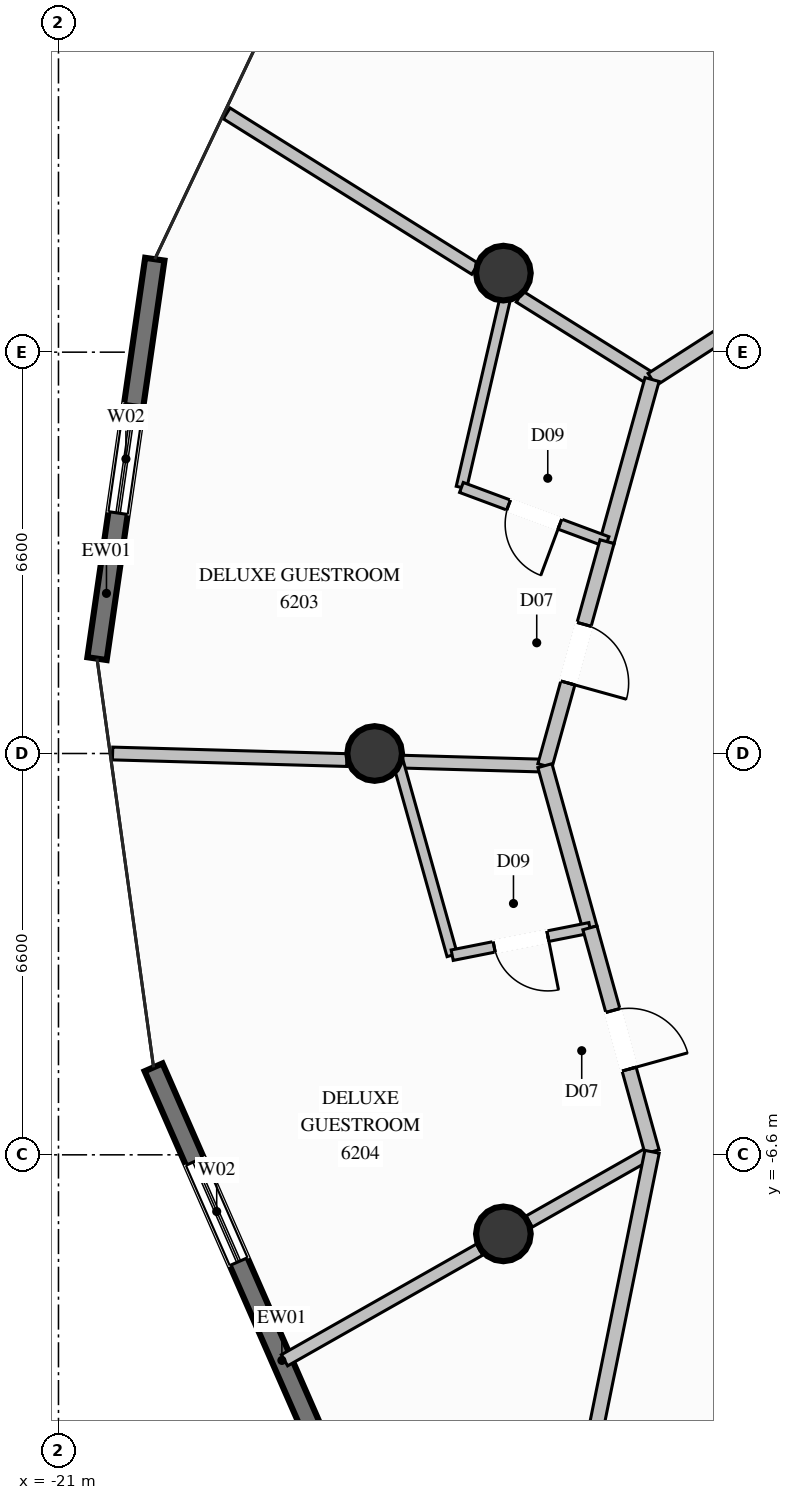
"""IFC4 building model, lengths in metres.
Left out: names, types, materials, properties, quantities, classifications, styles, units other than length and angle.
Written with IfcOpenShell. Run it as: python <this file> out.ifc"""

import sys

from ifc_helpers import new_model, si_unit, direction, frame, frame_2d, origin, origin_2d, place, context, subcontext, project, spatial, rectangle, circle, extrude, element, fill, save


model = new_model("IFC4")
c1 = context("Model", 3, precision=1e-05, world=origin(), true_north=direction((0.0, 1.0)))
c2 = subcontext(c1, "Body", "Model", "MODEL_VIEW")
j1 = project(units=[si_unit("LENGTHUNIT", "METRE"), si_unit("PLANEANGLEUNIT", "RADIAN")], contexts=[c1])
p1 = place(None, origin())
s1 = spatial("IfcSite", under=j1, at=p1, CompositionType="ELEMENT")
p2 = place(p1, origin())
s2 = spatial("IfcBuilding", under=s1, at=p2, CompositionType="ELEMENT")
p3 = place(p2, frame((0.0, 0.0, 230.8)))
s3 = spatial("IfcBuildingStorey", under=s2, at=p3, CompositionType="ELEMENT", Elevation=230.8)
for number, where, z_axis, x_axis in (
    (1, (-13.683, 7.9, 0.0), (0.0, 0.0, 1.0), (1.0, 0.0, 0.0)),
    (2, (-15.8, 0.0, 0.0), (0.0, 0.0, 1.0), (1.0, 0.0, 0.0)),
    (3, (-13.683, -7.9, 0.0), (0.0, 0.0, 1.0), (1.0, 0.0, 0.0)),
):
    element("IfcColumn", number, at=place(p3, frame(where, z_axis=z_axis, x_axis=x_axis)), inside=s3, PredefinedType="COLUMN", context=c2, shape_type="SweptSolid", body=[
        extrude(circle(Radius=0.45, at=origin_2d()), origin(), (0.0, 0.0, 1.0), 3.6),
    ])
p4 = place(p3, frame((-20.366, 1.56, 0.0), z_axis=(0.0, 0.0, 1.0), x_axis=(0.143125707186, 0.989704517491, 0.0)))
e4 = element("IfcWall", 4, at=p4, inside=s3, PredefinedType="SOLIDWALL", context=c2, shape_type="SweptSolid", body=[
    extrude(rectangle(XDim=6.637, YDim=0.32, at=frame_2d((3.319, 0.0))), origin(), (0.0, 0.0, 1.0), 3.2),
])
p5 = place(p4, frame((2.419, 0.0, 0.35)))
e5 = element("IfcOpeningElement", 5, at=p5, cuts=e4, PredefinedType="OPENING", context=c2, shape_type="SweptSolid", body=[
    extrude(rectangle(XDim=1.8, YDim=2.6, at=frame_2d((0.9, 1.3))), frame((0.0, 0.17, 0.0), z_axis=(0.0, -1.0, 0.0), x_axis=(1.0, 0.0, 0.0)), (0.0, 0.0, 1.0), 0.34),
])
p6 = place(p3, frame((-16.715, -11.376, 0.0), z_axis=(0.0, 0.0, 1.0), x_axis=(-0.401047234641, 0.916057375707, 0.0)))
e6 = element("IfcWall", 6, at=p6, inside=s3, PredefinedType="SOLIDWALL", context=c2, shape_type="SweptSolid", body=[
    extrude(rectangle(XDim=6.785, YDim=0.32, at=frame_2d((3.392, 0.0))), origin(), (0.0, 0.0, 1.0), 3.2),
])
p7 = place(p6, frame((3.296, 0.0, 0.35)))
e7 = element("IfcOpeningElement", 7, at=p7, cuts=e6, PredefinedType="OPENING", context=c2, shape_type="SweptSolid", body=[
    extrude(rectangle(XDim=1.8, YDim=2.6, at=frame_2d((0.9, 1.3))), frame((0.0, 0.17, 0.0), z_axis=(0.0, -1.0, 0.0), x_axis=(1.0, 0.0, 0.0)), (0.0, 0.0, 1.0), 0.34),
])
p8 = place(p3, frame((-11.238, 6.15, 0.0), z_axis=(0.0, 0.0, 1.0), x_axis=(-0.847683196706, 0.530502778524, 0.0)))
e8 = element("IfcWall", 8, at=p8, inside=s3, PredefinedType="PARTITIONING", context=c2, shape_type="SweptSolid", body=[
    extrude(rectangle(XDim=2.569, YDim=0.21, at=frame_2d((1.285, 0.0))), origin(), (0.0, 0.0, 1.0), 2.067),
])
p9 = place(p3, frame((-14.148, 7.97, 0.0), z_axis=(0.0, 0.0, 1.0), x_axis=(-0.84767945367, 0.530508759425, 0.0)))
e9 = element("IfcWall", 9, at=p9, inside=s3, PredefinedType="PARTITIONING", context=c2, shape_type="SweptSolid", body=[
    extrude(rectangle(XDim=4.82, YDim=0.21, at=frame_2d((2.41, 0.0))), origin(), (0.0, 0.0, 1.0), 3.2),
])
p10 = place(p3, frame((-13.0, -0.2, 0.0), z_axis=(0.0, 0.0, 1.0), x_axis=(-0.999606531068, 0.028049653231, 0.0)))
e10 = element("IfcWall", 10, at=p10, inside=s3, PredefinedType="PARTITIONING", context=c2, shape_type="SweptSolid", body=[
    extrude(rectangle(XDim=2.35, YDim=0.21, at=frame_2d((1.175, 0.0))), origin(), (0.0, 0.0, 1.0), 2.067),
])
p11 = place(p3, frame((-16.257, -0.108, 0.0), z_axis=(0.0, 0.0, 1.0), x_axis=(-0.999608046027, 0.027995612492, 0.0)))
e11 = element("IfcWall", 11, at=p11, inside=s3, PredefinedType="PARTITIONING", context=c2, shape_type="SweptSolid", body=[
    extrude(rectangle(XDim=3.854, YDim=0.21, at=frame_2d((1.927, 0.0))), origin(), (0.0, 0.0, 1.0), 3.2),
])
p12 = place(p3, frame((-11.238, -6.55, 0.0), z_axis=(0.0, 0.0, 1.0), x_axis=(-0.869700542226, -0.493579747207, 0.0)))
e12 = element("IfcWall", 12, at=p12, inside=s3, PredefinedType="PARTITIONING", context=c2, shape_type="SweptSolid", body=[
    extrude(rectangle(XDim=2.324, YDim=0.21, at=frame_2d((1.162, 0.0))), origin(), (0.0, 0.0, 1.0), 2.067),
])
p13 = place(p3, frame((-14.075, -8.159, 0.0), z_axis=(0.0, 0.0, 1.0), x_axis=(-0.869766541186, -0.49346343718, 0.0)))
e13 = element("IfcWall", 13, at=p13, inside=s3, PredefinedType="PARTITIONING", context=c2, shape_type="SweptSolid", body=[
    extrude(rectangle(XDim=3.688, YDim=0.21, at=frame_2d((1.844, 0.0))), origin(), (0.0, 0.0, 1.0), 3.2),
])
p14 = place(p3, frame((-11.238, 6.15, 0.0), z_axis=(0.0, 0.0, 1.0), x_axis=(0.841118406986, 0.540851019625, 0.0)))
e14 = element("IfcWall", 14, at=p14, inside=s3, PredefinedType="PARTITIONING", context=c2, shape_type="SweptSolid", body=[
    extrude(rectangle(XDim=4.622, YDim=0.24, at=frame_2d((2.311, 0.0))), origin(), (0.0, 0.0, 1.0), 3.2),
])
p15 = place(p14, frame((1.811, 0.0, 0.0)))
e15 = element("IfcOpeningElement", 15, at=p15, cuts=e14, PredefinedType="OPENING", context=c2, shape_type="SweptSolid", body=[
    extrude(rectangle(XDim=1.0, YDim=2.2, at=frame_2d((0.5, 1.1))), frame((0.0, 0.13, 0.0), z_axis=(0.0, -1.0, 0.0), x_axis=(1.0, 0.0, 0.0)), (0.0, 0.0, 1.0), 0.26),
])
p16 = place(p3, frame((-11.238, 6.15, 0.0), z_axis=(0.0, 0.0, 1.0), x_axis=(-0.267361785392, -0.963596220266, 0.0)))
e16 = element("IfcWall", 16, at=p16, inside=s3, PredefinedType="PARTITIONING", context=c2, shape_type="SweptSolid", body=[
    extrude(rectangle(XDim=2.768, YDim=0.24, at=frame_2d((1.384, 0.0))), origin(), (0.0, 0.0, 1.0), 3.2),
])
p17 = place(p3, frame((-13.617, 7.638, 0.0), z_axis=(0.0, 0.0, 1.0), x_axis=(-0.225743113999, -0.974186864253, 0.0)))
e17 = element("IfcWall", 17, at=p17, inside=s3, PredefinedType="PLUMBINGWALL", context=c2, shape_type="SweptSolid", body=[
    extrude(rectangle(XDim=3.349, YDim=0.175, at=frame_2d((1.675, 0.0))), origin(), (0.0, 0.0, 1.0), 2.769),
])
p18 = place(p3, frame((-11.978, 3.483, 0.0), z_axis=(0.0, 0.0, 1.0), x_axis=(-0.93710417217, 0.349049810918, 0.0)))
e18 = element("IfcWall", 18, at=p18, inside=s3, PredefinedType="PLUMBINGWALL", context=c2, shape_type="SweptSolid", body=[
    extrude(rectangle(XDim=2.556, YDim=0.175, at=frame_2d((1.278, 0.0))), origin(), (0.0, 0.0, 1.0), 3.2),
])
p19 = place(p18, frame((0.828, 0.0, 0.0)))
e19 = element("IfcOpeningElement", 19, at=p19, cuts=e18, PredefinedType="OPENING", context=c2, shape_type="SweptSolid", body=[
    extrude(rectangle(XDim=0.9, YDim=2.1, at=frame_2d((0.45, 1.05))), frame((0.0, 0.098, 0.0), z_axis=(0.0, -1.0, 0.0), x_axis=(1.0, 0.0, 0.0)), (0.0, 0.0, 1.0), 0.195),
])
p20 = place(p3, frame((-11.978, 3.483, 0.0), z_axis=(0.0, 0.0, 1.0), x_axis=(-0.267390175797, -0.963588342544, 0.0)))
e20 = element("IfcWall", 20, at=p20, inside=s3, PredefinedType="PARTITIONING", context=c2, shape_type="SweptSolid", body=[
    extrude(rectangle(XDim=3.822, YDim=0.24, at=frame_2d((1.911, 0.0))), origin(), (0.0, 0.0, 1.0), 3.2),
])
p21 = place(p20, frame((1.411, 0.0, 0.0)))
e21 = element("IfcOpeningElement", 21, at=p21, cuts=e20, PredefinedType="OPENING", context=c2, shape_type="SweptSolid", body=[
    extrude(rectangle(XDim=1.0, YDim=2.2, at=frame_2d((0.5, 1.1))), frame((0.0, 0.13, 0.0), z_axis=(0.0, -1.0, 0.0), x_axis=(1.0, 0.0, 0.0)), (0.0, 0.0, 1.0), 0.26),
])
p22 = place(p3, frame((-13.0, -0.2, 0.0), z_axis=(0.0, 0.0, 1.0), x_axis=(0.267361785392, -0.963596220266, 0.0)))
e22 = element("IfcWall", 22, at=p22, inside=s3, PredefinedType="PARTITIONING", context=c2, shape_type="SweptSolid", body=[
    extrude(rectangle(XDim=2.768, YDim=0.24, at=frame_2d((1.384, 0.0))), origin(), (0.0, 0.0, 1.0), 3.2),
])
p23 = place(p3, frame((-15.417, -0.132, 0.0), z_axis=(0.0, 0.0, 1.0), x_axis=(0.269725754304, -0.962937182512, 0.0)))
e23 = element("IfcWall", 23, at=p23, inside=s3, PredefinedType="PLUMBINGWALL", context=c2, shape_type="SweptSolid", body=[
    extrude(rectangle(XDim=3.307, YDim=0.175, at=frame_2d((1.654, 0.0))), origin(), (0.0, 0.0, 1.0), 2.769),
])
p24 = place(p3, frame((-12.26, -2.867, 0.0), z_axis=(0.0, 0.0, 1.0), x_axis=(-0.980831984307, -0.194855378579, 0.0)))
e24 = element("IfcWall", 24, at=p24, inside=s3, PredefinedType="PLUMBINGWALL", context=c2, shape_type="SweptSolid", body=[
    extrude(rectangle(XDim=2.309, YDim=0.175, at=frame_2d((1.155, 0.0))), origin(), (0.0, 0.0, 1.0), 3.2),
])
p25 = place(p24, frame((0.705, 0.0, 0.0)))
e25 = element("IfcOpeningElement", 25, at=p25, cuts=e24, PredefinedType="OPENING", context=c2, shape_type="SweptSolid", body=[
    extrude(rectangle(XDim=0.9, YDim=2.1, at=frame_2d((0.45, 1.05))), frame((0.0, 0.098, 0.0), z_axis=(0.0, -1.0, 0.0), x_axis=(1.0, 0.0, 0.0)), (0.0, 0.0, 1.0), 0.195),
])
p26 = place(p3, frame((-12.26, -2.867, 0.0), z_axis=(0.0, 0.0, 1.0), x_axis=(0.267373718537, -0.963592909187, 0.0)))
e26 = element("IfcWall", 26, at=p26, inside=s3, PredefinedType="PARTITIONING", context=c2, shape_type="SweptSolid", body=[
    extrude(rectangle(XDim=3.822, YDim=0.24, at=frame_2d((1.911, 0.0))), origin(), (0.0, 0.0, 1.0), 3.2),
])
p27 = place(p26, frame((1.411, 0.0, 0.0)))
e27 = element("IfcOpeningElement", 27, at=p27, cuts=e26, PredefinedType="OPENING", context=c2, shape_type="SweptSolid", body=[
    extrude(rectangle(XDim=1.0, YDim=2.2, at=frame_2d((0.5, 1.1))), frame((0.0, 0.13, 0.0), z_axis=(0.0, -1.0, 0.0), x_axis=(1.0, 0.0, 0.0)), (0.0, 0.0, 1.0), 0.26),
])
p28 = place(p3, frame((-11.238, -6.55, 0.0), z_axis=(0.0, 0.0, 1.0), x_axis=(-0.198271934001, -0.980147050288, 0.0)))
e28 = element("IfcWall", 28, at=p28, inside=s3, PredefinedType="PARTITIONING", context=c2, shape_type="SweptSolid", body=[
    extrude(rectangle(XDim=5.356, YDim=0.24, at=frame_2d((2.678, 0.0))), origin(), (0.0, 0.0, 1.0), 3.2),
])
p29 = place(p5, origin())
e29 = element("IfcWindow", 29, at=p29, inside=s3, PartitioningType="SINGLE_PANEL", PredefinedType="WINDOW", context=c2, shape_type="SweptSolid", body=[
    extrude(rectangle(XDim=1.8, YDim=2.6, at=frame_2d((0.9, 1.3))), frame((0.0, 0.03, 0.0), z_axis=(0.0, -1.0, 0.0), x_axis=(1.0, 0.0, 0.0)), (0.0, 0.0, 1.0), 0.06),
])
fill(e5, e29)
p30 = place(p7, origin())
e30 = element("IfcWindow", 30, at=p30, inside=s3, PartitioningType="SINGLE_PANEL", PredefinedType="WINDOW", context=c2, shape_type="SweptSolid", body=[
    extrude(rectangle(XDim=1.8, YDim=2.6, at=frame_2d((0.9, 1.3))), frame((0.0, 0.03, 0.0), z_axis=(0.0, -1.0, 0.0), x_axis=(1.0, 0.0, 0.0)), (0.0, 0.0, 1.0), 0.06),
])
fill(e7, e30)
p31 = place(p19, origin())
e31 = element("IfcDoor", 31, at=p31, inside=s3, OperationType="SINGLE_SWING_LEFT", PredefinedType="DOOR", context=c2, shape_type="SweptSolid", body=[
    extrude(rectangle(XDim=0.9, YDim=2.1, at=frame_2d((0.45, 1.05))), frame((0.0, 0.025, 0.0), z_axis=(0.0, -1.0, 0.0), x_axis=(1.0, 0.0, 0.0)), (0.0, 0.0, 1.0), 0.05),
])
fill(e19, e31)
p32 = place(p21, origin())
e32 = element("IfcDoor", 32, at=p32, inside=s3, OperationType="SINGLE_SWING_RIGHT", PredefinedType="DOOR", context=c2, shape_type="SweptSolid", body=[
    extrude(rectangle(XDim=1.0, YDim=2.2, at=frame_2d((0.5, 1.1))), frame((0.0, 0.025, 0.0), z_axis=(0.0, -1.0, 0.0), x_axis=(1.0, 0.0, 0.0)), (0.0, 0.0, 1.0), 0.05),
])
fill(e21, e32)
p33 = place(p25, origin())
e33 = element("IfcDoor", 33, at=p33, inside=s3, OperationType="SINGLE_SWING_LEFT", PredefinedType="DOOR", context=c2, shape_type="SweptSolid", body=[
    extrude(rectangle(XDim=0.9, YDim=2.1, at=frame_2d((0.45, 1.05))), frame((0.0, 0.025, 0.0), z_axis=(0.0, -1.0, 0.0), x_axis=(1.0, 0.0, 0.0)), (0.0, 0.0, 1.0), 0.05),
])
fill(e25, e33)
p34 = place(p27, origin())
e34 = element("IfcDoor", 34, at=p34, inside=s3, OperationType="SINGLE_SWING_RIGHT", PredefinedType="DOOR", context=c2, shape_type="SweptSolid", body=[
    extrude(rectangle(XDim=1.0, YDim=2.2, at=frame_2d((0.5, 1.1))), frame((0.0, 0.025, 0.0), z_axis=(0.0, -1.0, 0.0), x_axis=(1.0, 0.0, 0.0)), (0.0, 0.0, 1.0), 0.05),
])
fill(e27, e34)
save(model, sys.argv[1])
